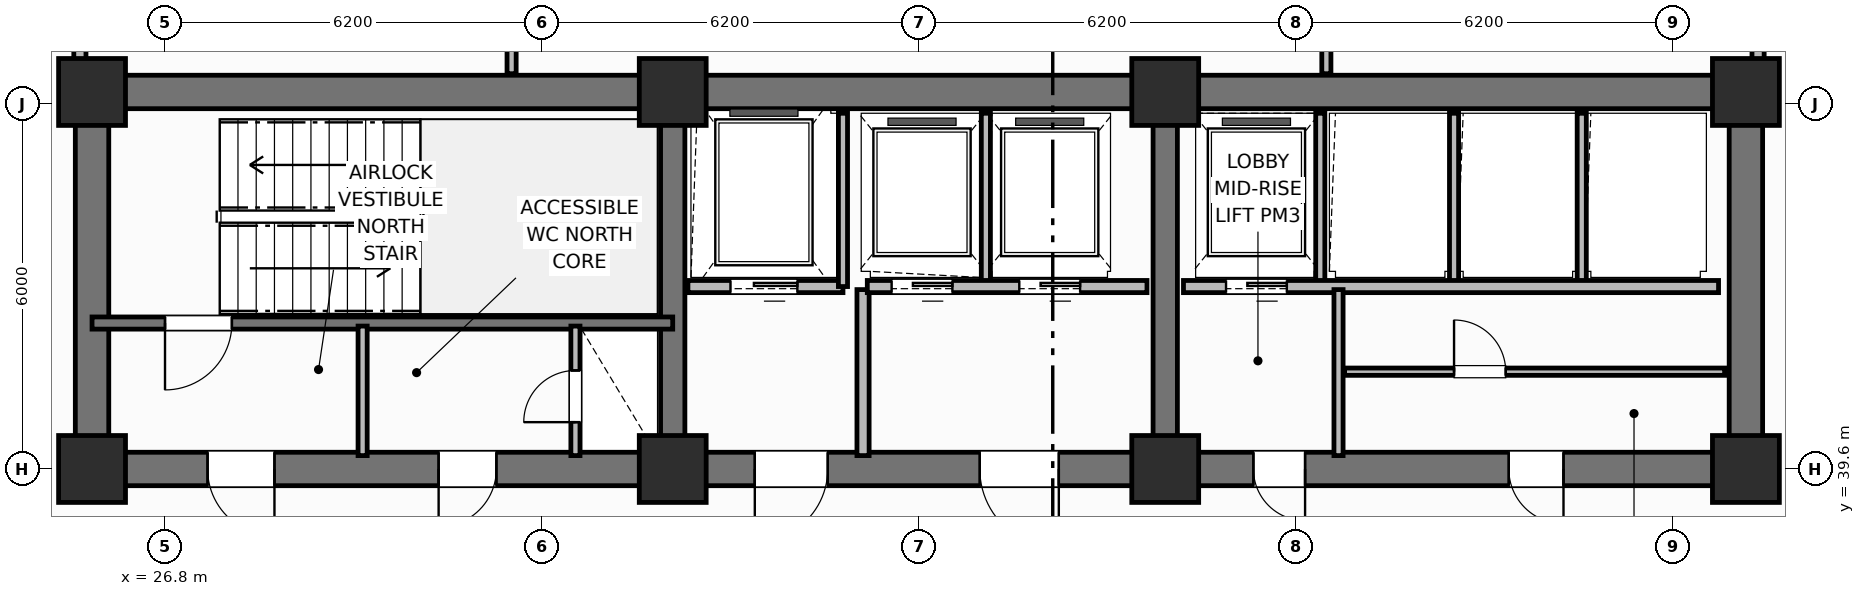
"""IFC4 building model, lengths in metres.
Left out: names, types, materials, properties, quantities, classifications, styles, units other than length and angle.
Written with IfcOpenShell. Run it as: python <this file> out.ifc"""

import sys

from ifc_helpers import new_model, si_unit, direction, frame, frame_2d, origin, origin_2d, place, context, subcontext, project, spatial, rectangle, extrude, element, fill, save


model = new_model("IFC4")
c1 = context("Model", 3, precision=1e-05, world=origin(), true_north=direction((0.0, 1.0)))
c2 = subcontext(c1, "Body", "Model", "MODEL_VIEW")
j1 = project(units=[si_unit("LENGTHUNIT", "METRE"), si_unit("PLANEANGLEUNIT", "RADIAN")], contexts=[c1])
p1 = place(None, origin())
s1 = spatial("IfcSite", under=j1, at=p1, CompositionType="ELEMENT")
p2 = place(p1, origin())
s2 = spatial("IfcBuilding", under=s1, at=p2, CompositionType="ELEMENT")
p3 = place(p2, frame((0.0, 0.0, 84.1)))
s3 = spatial("IfcBuildingStorey", under=s2, at=p3, CompositionType="ELEMENT", Elevation=84.1)
p4 = place(p3, frame((25.6, 45.8, 0.0), z_axis=(0.0, 0.0, 1.0), x_axis=(1.0, 0.0, 0.0)))
e1 = element("IfcWall", 1, at=p4, inside=s3, PredefinedType="SHEAR", context=c2, shape_type="SweptSolid", body=[
    extrude(rectangle(XDim=27.2, YDim=0.55, at=frame_2d((13.6, 0.0))), origin(), (0.0, 0.0, 1.0), 4.2),
])
for number, where, z_axis, x_axis in (
    (2, (25.6, 39.875, 0.0), (0.0, 0.0, 1.0), (0.0, 1.0, 0.0)),
    (3, (52.8, 39.875, 0.0), (0.0, 0.0, 1.0), (0.0, 1.0, 0.0)),
):
    element("IfcWall", number, at=place(p3, frame(where, z_axis=z_axis, x_axis=x_axis)), inside=s3, PredefinedType="SHEAR", context=c2, shape_type="SweptSolid", body=[
        extrude(rectangle(XDim=5.65, YDim=0.55, at=frame_2d((2.825, 0.0))), origin(), (0.0, 0.0, 1.0), 4.2),
    ])
p5 = place(p3, frame((52.8, 39.6, 0.0), z_axis=(0.0, 0.0, 1.0), x_axis=(-1.0, 0.0, 0.0)))
e4 = element("IfcWall", 4, at=p5, inside=s3, PredefinedType="SHEAR", context=c2, shape_type="SweptSolid", body=[
    extrude(rectangle(XDim=27.2, YDim=0.55, at=frame_2d((13.6, 0.0))), origin(), (0.0, 0.0, 1.0), 4.2),
])
p6 = place(p5, frame((24.2, 0.0, 0.0)))
e5 = element("IfcOpeningElement", 5, at=p6, cuts=e4, PredefinedType="OPENING", context=c2, shape_type="SweptSolid", body=[
    extrude(rectangle(XDim=1.1, YDim=2.15, at=frame_2d((0.55, 1.075))), frame((0.0, 0.285, 0.0), z_axis=(0.0, -1.0, 0.0), x_axis=(1.0, 0.0, 0.0)), (0.0, 0.0, 1.0), 0.57),
])
p7 = place(p5, frame((20.55, 0.0, 0.0)))
e6 = element("IfcOpeningElement", 6, at=p7, cuts=e4, PredefinedType="OPENING", context=c2, shape_type="SweptSolid", body=[
    extrude(rectangle(XDim=0.95, YDim=2.1, at=frame_2d((0.475, 1.05))), frame((0.0, 0.285, 0.0), z_axis=(0.0, -1.0, 0.0), x_axis=(1.0, 0.0, 0.0)), (0.0, 0.0, 1.0), 0.57),
])
p8 = place(p5, frame((15.1, 0.0, 0.0)))
e7 = element("IfcOpeningElement", 7, at=p8, cuts=e4, PredefinedType="OPENING", context=c2, shape_type="SweptSolid", body=[
    extrude(rectangle(XDim=1.2, YDim=2.15, at=frame_2d((0.6, 1.075))), frame((0.0, 0.285, 0.0), z_axis=(0.0, -1.0, 0.0), x_axis=(1.0, 0.0, 0.0)), (0.0, 0.0, 1.0), 0.57),
])
p9 = place(p5, frame((11.3, 0.0, 0.0)))
e8 = element("IfcOpeningElement", 8, at=p9, cuts=e4, PredefinedType="OPENING", context=c2, shape_type="SweptSolid", body=[
    extrude(rectangle(XDim=1.3, YDim=2.2, at=frame_2d((0.65, 1.1))), frame((0.0, 0.285, 0.0), z_axis=(0.0, -1.0, 0.0), x_axis=(1.0, 0.0, 0.0)), (0.0, 0.0, 1.0), 0.57),
])
p10 = place(p5, frame((7.25, 0.0, 0.0)))
e9 = element("IfcOpeningElement", 9, at=p10, cuts=e4, PredefinedType="OPENING", context=c2, shape_type="SweptSolid", body=[
    extrude(rectangle(XDim=0.85, YDim=2.1, at=frame_2d((0.425, 1.05))), frame((0.0, 0.285, 0.0), z_axis=(0.0, -1.0, 0.0), x_axis=(1.0, 0.0, 0.0)), (0.0, 0.0, 1.0), 0.57),
])
p11 = place(p5, frame((3.0, 0.0, 0.0)))
e10 = element("IfcOpeningElement", 10, at=p11, cuts=e4, PredefinedType="OPENING", context=c2, shape_type="SweptSolid", body=[
    extrude(rectangle(XDim=0.9, YDim=2.1, at=frame_2d((0.45, 1.05))), frame((0.0, 0.285, 0.0), z_axis=(0.0, -1.0, 0.0), x_axis=(1.0, 0.0, 0.0)), (0.0, 0.0, 1.0), 0.57),
])
for number, where, z_axis, x_axis in (
    (11, (35.15, 39.875, 0.0), (0.0, 0.0, 1.0), (0.0, 1.0, 0.0)),
    (12, (43.25, 39.875, 0.0), (0.0, 0.0, 1.0), (0.0, 1.0, 0.0)),
):
    element("IfcWall", number, at=place(p3, frame(where, z_axis=z_axis, x_axis=x_axis)), inside=s3, PredefinedType="SHEAR", context=c2, shape_type="SweptSolid", body=[
        extrude(rectangle(XDim=5.65, YDim=0.4, at=frame_2d((2.825, 0.0))), origin(), (0.0, 0.0, 1.0), 4.2),
    ])
for number, where, z_axis, x_axis in (
    (13, (25.6, 39.6, 0.0), (0.0, 0.0, 1.0), (1.0, 0.0, 0.0)),
    (14, (25.6, 45.8, 0.0), (0.0, 0.0, 1.0), (1.0, 0.0, 0.0)),
    (15, (35.15, 39.6, 0.0), (0.0, 0.0, 1.0), (1.0, 0.0, 0.0)),
    (16, (35.15, 45.8, 0.0), (0.0, 0.0, 1.0), (1.0, 0.0, 0.0)),
    (17, (43.25, 39.6, 0.0), (0.0, 0.0, 1.0), (1.0, 0.0, 0.0)),
    (18, (43.25, 45.8, 0.0), (0.0, 0.0, 1.0), (1.0, 0.0, 0.0)),
    (19, (52.8, 39.6, 0.0), (0.0, 0.0, 1.0), (1.0, 0.0, 0.0)),
    (20, (52.8, 45.8, 0.0), (0.0, 0.0, 1.0), (1.0, 0.0, 0.0)),
):
    element("IfcColumn", number, at=place(p3, frame(where, z_axis=z_axis, x_axis=x_axis)), inside=s3, PredefinedType="COLUMN", context=c2, shape_type="SweptSolid", body=[
        extrude(rectangle(XDim=1.1, YDim=1.1, at=origin_2d()), origin(), (0.0, 0.0, 1.0), 4.2),
    ])
p12 = place(p3, frame((35.15, 42.0, 0.0), z_axis=(0.0, 0.0, 1.0), x_axis=(-1.0, 0.0, 0.0)))
e21 = element("IfcWall", 21, at=p12, inside=s3, PredefinedType="SHEAR", context=c2, shape_type="SweptSolid", body=[
    extrude(rectangle(XDim=9.55, YDim=0.2, at=frame_2d((4.775, 0.0))), origin(), (0.0, 0.0, 1.0), 4.2),
])
p13 = place(p12, frame((7.25, 0.0, 0.0)))
e22 = element("IfcOpeningElement", 22, at=p13, cuts=e21, PredefinedType="OPENING", context=c2, shape_type="SweptSolid", body=[
    extrude(rectangle(XDim=1.1, YDim=2.15, at=frame_2d((0.55, 1.075))), frame((0.0, 0.11, 0.0), z_axis=(0.0, -1.0, 0.0), x_axis=(1.0, 0.0, 0.0)), (0.0, 0.0, 1.0), 0.22),
])
p14 = place(p3, frame((33.55, 39.82, 0.0), z_axis=(0.0, 0.0, 1.0), x_axis=(0.0, 1.0, 0.0)))
e23 = element("IfcWall", 23, at=p14, inside=s3, PredefinedType="PARTITIONING", context=c2, shape_type="SweptSolid", body=[
    extrude(rectangle(XDim=2.13, YDim=0.15, at=frame_2d((1.065, 0.0))), origin(), (0.0, 0.0, 1.0), 3.03),
])
p15 = place(p14, frame((0.55, 0.0, 0.0)))
e24 = element("IfcOpeningElement", 24, at=p15, cuts=e23, PredefinedType="OPENING", context=c2, shape_type="SweptSolid", body=[
    extrude(rectangle(XDim=0.85, YDim=2.05, at=frame_2d((0.425, 1.025))), frame((0.0, 0.085, 0.0), z_axis=(0.0, -1.0, 0.0), x_axis=(1.0, 0.0, 0.0)), (0.0, 0.0, 1.0), 0.17),
])
p16 = place(p3, frame((30.05, 39.82, 0.0), z_axis=(0.0, 0.0, 1.0), x_axis=(0.0, 1.0, 0.0)))
e25 = element("IfcWall", 25, at=p16, inside=s3, PredefinedType="PARTITIONING", context=c2, shape_type="SweptSolid", body=[
    extrude(rectangle(XDim=2.13, YDim=0.15, at=frame_2d((1.065, 0.0))), origin(), (0.0, 0.0, 1.0), 3.03),
])
p17 = place(p3, frame((37.95, 42.6, 0.0), z_axis=(0.0, 0.0, 1.0), x_axis=(-1.0, 0.0, 0.0)))
e26 = element("IfcWall", 26, at=p17, inside=s3, PredefinedType="PARTITIONING", context=c2, shape_type="SweptSolid", body=[
    extrude(rectangle(XDim=2.55, YDim=0.2, at=frame_2d((1.275, 0.0))), origin(), (0.0, 0.0, 1.0), 2.8),
])
p18 = place(p17, frame((0.75, 0.0, 0.0)))
e27 = element("IfcOpeningElement", 27, at=p18, cuts=e26, PredefinedType="OPENING", context=c2, shape_type="SweptSolid", body=[
    extrude(rectangle(XDim=1.1, YDim=2.15, at=frame_2d((0.55, 1.075))), frame((0.0, 0.11, 0.0), z_axis=(0.0, -1.0, 0.0), x_axis=(1.0, 0.0, 0.0)), (0.0, 0.0, 1.0), 0.22),
])
p19 = place(p3, frame((37.95, 42.6, 0.0), z_axis=(0.0, 0.0, 1.0), x_axis=(0.0, 1.0, 0.0)))
e28 = element("IfcWall", 28, at=p19, inside=s3, PredefinedType="PARTITIONING", context=c2, shape_type="SweptSolid", body=[
    extrude(rectangle(XDim=2.85, YDim=0.15, at=frame_2d((1.425, 0.0))), origin(), (0.0, 0.0, 1.0), 3.03),
])
p20 = place(p3, frame((38.28, 39.82, 0.0), z_axis=(0.0, 0.0, 1.0), x_axis=(0.0, 1.0, 0.0)))
e29 = element("IfcWall", 29, at=p20, inside=s3, PredefinedType="PARTITIONING", context=c2, shape_type="SweptSolid", body=[
    extrude(rectangle(XDim=2.73, YDim=0.2, at=frame_2d((1.365, 0.0))), origin(), (0.0, 0.0, 1.0), 3.03),
])
p21 = place(p3, frame((40.3, 42.65, 0.0), z_axis=(0.0, 0.0, 1.0), x_axis=(0.0, 1.0, 0.0)))
e30 = element("IfcWall", 30, at=p21, inside=s3, PredefinedType="PARTITIONING", context=c2, shape_type="SweptSolid", body=[
    extrude(rectangle(XDim=2.8, YDim=0.15, at=frame_2d((1.4, 0.0))), origin(), (0.0, 0.0, 1.0), 3.03),
])
p22 = place(p3, frame((42.95, 42.6, 0.0), z_axis=(0.0, 0.0, 1.0), x_axis=(-1.0, 0.0, 0.0)))
e31 = element("IfcWall", 31, at=p22, inside=s3, PredefinedType="PARTITIONING", context=c2, shape_type="SweptSolid", body=[
    extrude(rectangle(XDim=4.6, YDim=0.2, at=frame_2d((2.3, 0.0))), origin(), (0.0, 0.0, 1.0), 2.8),
])
p23 = place(p22, frame((3.2, 0.0, 0.0)))
e32 = element("IfcOpeningElement", 32, at=p23, cuts=e31, PredefinedType="OPENING", context=c2, shape_type="SweptSolid", body=[
    extrude(rectangle(XDim=1.0, YDim=2.15, at=frame_2d((0.5, 1.075))), frame((0.0, 0.11, 0.0), z_axis=(0.0, -1.0, 0.0), x_axis=(1.0, 0.0, 0.0)), (0.0, 0.0, 1.0), 0.22),
])
p24 = place(p22, frame((1.1, 0.0, 0.0)))
e33 = element("IfcOpeningElement", 33, at=p24, cuts=e31, PredefinedType="OPENING", context=c2, shape_type="SweptSolid", body=[
    extrude(rectangle(XDim=1.0, YDim=2.15, at=frame_2d((0.5, 1.075))), frame((0.0, 0.11, 0.0), z_axis=(0.0, -1.0, 0.0), x_axis=(1.0, 0.0, 0.0)), (0.0, 0.0, 1.0), 0.22),
])
for number, where, z_axis, x_axis in (
    (34, (45.8, 42.65, 0.0), (0.0, 0.0, 1.0), (0.0, 1.0, 0.0)),
    (35, (48.0, 42.65, 0.0), (0.0, 0.0, 1.0), (0.0, 1.0, 0.0)),
    (36, (50.1, 42.65, 0.0), (0.0, 0.0, 1.0), (0.0, 1.0, 0.0)),
):
    element("IfcWall", number, at=place(p3, frame(where, z_axis=z_axis, x_axis=x_axis)), inside=s3, PredefinedType="PARTITIONING", context=c2, shape_type="SweptSolid", body=[
        extrude(rectangle(XDim=2.8, YDim=0.15, at=frame_2d((1.4, 0.0))), origin(), (0.0, 0.0, 1.0), 3.03),
    ])
p25 = place(p3, frame((52.35, 42.6, 0.0), z_axis=(0.0, 0.0, 1.0), x_axis=(-1.0, 0.0, 0.0)))
e37 = element("IfcWall", 37, at=p25, inside=s3, PredefinedType="PARTITIONING", context=c2, shape_type="SweptSolid", body=[
    extrude(rectangle(XDim=8.8, YDim=0.2, at=frame_2d((4.4, 0.0))), origin(), (0.0, 0.0, 1.0), 3.03),
])
p26 = place(p25, frame((7.1, 0.0, 0.0)))
e38 = element("IfcOpeningElement", 38, at=p26, cuts=e37, PredefinedType="OPENING", context=c2, shape_type="SweptSolid", body=[
    extrude(rectangle(XDim=1.0, YDim=2.15, at=frame_2d((0.5, 1.075))), frame((0.0, 0.11, 0.0), z_axis=(0.0, -1.0, 0.0), x_axis=(1.0, 0.0, 0.0)), (0.0, 0.0, 1.0), 0.22),
])
p27 = place(p3, frame((46.1, 39.82, 0.0), z_axis=(0.0, 0.0, 1.0), x_axis=(0.0, 1.0, 0.0)))
e39 = element("IfcWall", 39, at=p27, inside=s3, PredefinedType="PARTITIONING", context=c2, shape_type="SweptSolid", body=[
    extrude(rectangle(XDim=2.73, YDim=0.15, at=frame_2d((1.365, 0.0))), origin(), (0.0, 0.0, 1.0), 3.03),
])
p28 = place(p3, frame((46.2, 41.2, 0.0), z_axis=(0.0, 0.0, 1.0), x_axis=(1.0, 0.0, 0.0)))
e40 = element("IfcWall", 40, at=p28, inside=s3, PredefinedType="PARTITIONING", context=c2, shape_type="SweptSolid", body=[
    extrude(rectangle(XDim=6.25, YDim=0.12, at=frame_2d((3.125, 0.0))), origin(), (0.0, 0.0, 1.0), 3.03),
])
p29 = place(p28, frame((1.8, 0.0, 0.0)))
e41 = element("IfcOpeningElement", 41, at=p29, cuts=e40, PredefinedType="OPENING", context=c2, shape_type="SweptSolid", body=[
    extrude(rectangle(XDim=0.85, YDim=2.1, at=frame_2d((0.425, 1.05))), frame((0.0, 0.07, 0.0), z_axis=(0.0, -1.0, 0.0), x_axis=(1.0, 0.0, 0.0)), (0.0, 0.0, 1.0), 0.14),
])
p30 = place(p3, frame((32.5, 46.1, 0.0), z_axis=(0.0, 0.0, 1.0), x_axis=(0.0, 1.0, 0.0)))
e42 = element("IfcWall", 42, at=p30, inside=s3, PredefinedType="PARTITIONING", context=c2, shape_type="SweptSolid", body=[
    extrude(rectangle(XDim=5.33, YDim=0.15, at=frame_2d((2.665, 0.0))), origin(), (0.0, 0.0, 1.0), 3.03),
])
p31 = place(p30, frame((0.85, 0.0, 0.0)))
e43 = element("IfcOpeningElement", 43, at=p31, cuts=e42, PredefinedType="OPENING", context=c2, shape_type="SweptSolid", body=[
    extrude(rectangle(XDim=0.9, YDim=2.1, at=frame_2d((0.45, 1.05))), frame((0.0, 0.085, 0.0), z_axis=(0.0, -1.0, 0.0), x_axis=(1.0, 0.0, 0.0)), (0.0, 0.0, 1.0), 0.17),
])
p32 = place(p3, frame((45.9, 46.1, 0.0), z_axis=(0.0, 0.0, 1.0), x_axis=(0.0, 1.0, 0.0)))
e44 = element("IfcWall", 44, at=p32, inside=s3, PredefinedType="PARTITIONING", context=c2, shape_type="SweptSolid", body=[
    extrude(rectangle(XDim=5.33, YDim=0.15, at=frame_2d((2.665, 0.0))), origin(), (0.0, 0.0, 1.0), 3.03),
])
p33 = place(p3, frame((25.4, 46.1, 0.0), z_axis=(0.0, 0.0, 1.0), x_axis=(0.0, 1.0, 0.0)))
e45 = element("IfcWall", 45, at=p33, inside=s3, PredefinedType="PARTITIONING", context=c2, shape_type="SweptSolid", body=[
    extrude(rectangle(XDim=4.78, YDim=0.2, at=frame_2d((2.39, 0.0))), origin(), (0.0, 0.0, 1.0), 3.03),
])
p34 = place(p33, frame((1.05, 0.0, 0.0)))
e46 = element("IfcOpeningElement", 46, at=p34, cuts=e45, PredefinedType="OPENING", context=c2, shape_type="SweptSolid", body=[
    extrude(rectangle(XDim=0.9, YDim=2.1, at=frame_2d((0.45, 1.05))), frame((0.0, 0.11, 0.0), z_axis=(0.0, -1.0, 0.0), x_axis=(1.0, 0.0, 0.0)), (0.0, 0.0, 1.0), 0.22),
])
p35 = place(p3, frame((53.0, 46.1, 0.0), z_axis=(0.0, 0.0, 1.0), x_axis=(0.0, 1.0, 0.0)))
e47 = element("IfcWall", 47, at=p35, inside=s3, PredefinedType="PARTITIONING", context=c2, shape_type="SweptSolid", body=[
    extrude(rectangle(XDim=4.78, YDim=0.2, at=frame_2d((2.39, 0.0))), origin(), (0.0, 0.0, 1.0), 3.03),
])
p36 = place(p35, frame((1.05, 0.0, 0.0)))
e48 = element("IfcOpeningElement", 48, at=p36, cuts=e47, PredefinedType="OPENING", context=c2, shape_type="SweptSolid", body=[
    extrude(rectangle(XDim=0.9, YDim=2.1, at=frame_2d((0.45, 1.05))), frame((0.0, 0.11, 0.0), z_axis=(0.0, -1.0, 0.0), x_axis=(1.0, 0.0, 0.0)), (0.0, 0.0, 1.0), 0.22),
])
p37 = place(p13, origin())
e49 = element("IfcDoor", 49, at=p37, inside=s3, OperationType="SINGLE_SWING_RIGHT", PredefinedType="DOOR", context=c2, shape_type="SweptSolid", body=[
    extrude(rectangle(XDim=1.1, YDim=2.15, at=frame_2d((0.55, 1.075))), frame((0.0, 0.025, 0.0), z_axis=(0.0, -1.0, 0.0), x_axis=(1.0, 0.0, 0.0)), (0.0, 0.0, 1.0), 0.05),
])
fill(e22, e49)
p38 = place(p15, origin())
e50 = element("IfcDoor", 50, at=p38, inside=s3, OperationType="SINGLE_SWING_LEFT", PredefinedType="TRAPDOOR", context=c2, shape_type="SweptSolid", body=[
    extrude(rectangle(XDim=0.85, YDim=2.05, at=frame_2d((0.425, 1.025))), frame((0.0, 0.025, 0.0), z_axis=(0.0, -1.0, 0.0), x_axis=(1.0, 0.0, 0.0)), (0.0, 0.0, 1.0), 0.05),
])
fill(e24, e50)
p39 = place(p18, origin())
e51 = element("IfcDoor", 51, at=p39, inside=s3, OperationType="SLIDING_TO_LEFT", PredefinedType="DOOR", context=c2, shape_type="SweptSolid", body=[
    extrude(rectangle(XDim=1.1, YDim=2.15, at=frame_2d((0.55, 1.075))), frame((0.0, 0.025, 0.0), z_axis=(0.0, -1.0, 0.0), x_axis=(1.0, 0.0, 0.0)), (0.0, 0.0, 1.0), 0.05),
])
fill(e27, e51)
p40 = place(p23, origin())
e52 = element("IfcDoor", 52, at=p40, inside=s3, OperationType="SLIDING_TO_LEFT", PredefinedType="DOOR", context=c2, shape_type="SweptSolid", body=[
    extrude(rectangle(XDim=1.0, YDim=2.15, at=frame_2d((0.5, 1.075))), frame((0.0, 0.025, 0.0), z_axis=(0.0, -1.0, 0.0), x_axis=(1.0, 0.0, 0.0)), (0.0, 0.0, 1.0), 0.05),
])
fill(e32, e52)
p41 = place(p24, origin())
e53 = element("IfcDoor", 53, at=p41, inside=s3, OperationType="SLIDING_TO_LEFT", PredefinedType="DOOR", context=c2, shape_type="SweptSolid", body=[
    extrude(rectangle(XDim=1.0, YDim=2.15, at=frame_2d((0.5, 1.075))), frame((0.0, 0.025, 0.0), z_axis=(0.0, -1.0, 0.0), x_axis=(1.0, 0.0, 0.0)), (0.0, 0.0, 1.0), 0.05),
])
fill(e33, e53)
p42 = place(p26, origin())
e54 = element("IfcDoor", 54, at=p42, inside=s3, OperationType="SLIDING_TO_LEFT", PredefinedType="DOOR", context=c2, shape_type="SweptSolid", body=[
    extrude(rectangle(XDim=1.0, YDim=2.15, at=frame_2d((0.5, 1.075))), frame((0.0, 0.025, 0.0), z_axis=(0.0, -1.0, 0.0), x_axis=(1.0, 0.0, 0.0)), (0.0, 0.0, 1.0), 0.05),
])
fill(e38, e54)
p43 = place(p29, origin())
e55 = element("IfcDoor", 55, at=p43, inside=s3, OperationType="SINGLE_SWING_LEFT", PredefinedType="DOOR", context=c2, shape_type="SweptSolid", body=[
    extrude(rectangle(XDim=0.85, YDim=2.1, at=frame_2d((0.425, 1.05))), frame((0.0, 0.025, 0.0), z_axis=(0.0, -1.0, 0.0), x_axis=(1.0, 0.0, 0.0)), (0.0, 0.0, 1.0), 0.05),
])
fill(e41, e55)
p44 = place(p6, origin())
e56 = element("IfcDoor", 56, at=p44, inside=s3, OperationType="SINGLE_SWING_LEFT", PredefinedType="DOOR", context=c2, shape_type="SweptSolid", body=[
    extrude(rectangle(XDim=1.1, YDim=2.15, at=frame_2d((0.55, 1.075))), frame((0.0, 0.025, 0.0), z_axis=(0.0, -1.0, 0.0), x_axis=(1.0, 0.0, 0.0)), (0.0, 0.0, 1.0), 0.05),
])
fill(e5, e56)
p45 = place(p7, origin())
e57 = element("IfcDoor", 57, at=p45, inside=s3, OperationType="SINGLE_SWING_RIGHT", PredefinedType="DOOR", context=c2, shape_type="SweptSolid", body=[
    extrude(rectangle(XDim=0.95, YDim=2.1, at=frame_2d((0.475, 1.05))), frame((0.0, 0.025, 0.0), z_axis=(0.0, -1.0, 0.0), x_axis=(1.0, 0.0, 0.0)), (0.0, 0.0, 1.0), 0.05),
])
fill(e6, e57)
p46 = place(p8, origin())
e58 = element("IfcDoor", 58, at=p46, inside=s3, OperationType="SINGLE_SWING_RIGHT", PredefinedType="DOOR", context=c2, shape_type="SweptSolid", body=[
    extrude(rectangle(XDim=1.2, YDim=2.15, at=frame_2d((0.6, 1.075))), frame((0.0, 0.025, 0.0), z_axis=(0.0, -1.0, 0.0), x_axis=(1.0, 0.0, 0.0)), (0.0, 0.0, 1.0), 0.05),
])
fill(e7, e58)
p47 = place(p9, origin())
e59 = element("IfcDoor", 59, at=p47, inside=s3, OperationType="SINGLE_SWING_LEFT", PredefinedType="DOOR", context=c2, shape_type="SweptSolid", body=[
    extrude(rectangle(XDim=1.3, YDim=2.2, at=frame_2d((0.65, 1.1))), frame((0.0, 0.025, 0.0), z_axis=(0.0, -1.0, 0.0), x_axis=(1.0, 0.0, 0.0)), (0.0, 0.0, 1.0), 0.05),
])
fill(e8, e59)
p48 = place(p10, origin())
e60 = element("IfcDoor", 60, at=p48, inside=s3, OperationType="SINGLE_SWING_LEFT", PredefinedType="DOOR", context=c2, shape_type="SweptSolid", body=[
    extrude(rectangle(XDim=0.85, YDim=2.1, at=frame_2d((0.425, 1.05))), frame((0.0, 0.025, 0.0), z_axis=(0.0, -1.0, 0.0), x_axis=(1.0, 0.0, 0.0)), (0.0, 0.0, 1.0), 0.05),
])
fill(e9, e60)
p49 = place(p11, origin())
e61 = element("IfcDoor", 61, at=p49, inside=s3, OperationType="SINGLE_SWING_LEFT", PredefinedType="DOOR", context=c2, shape_type="SweptSolid", body=[
    extrude(rectangle(XDim=0.9, YDim=2.1, at=frame_2d((0.45, 1.05))), frame((0.0, 0.025, 0.0), z_axis=(0.0, -1.0, 0.0), x_axis=(1.0, 0.0, 0.0)), (0.0, 0.0, 1.0), 0.05),
])
fill(e10, e61)
save(model, sys.argv[1])
